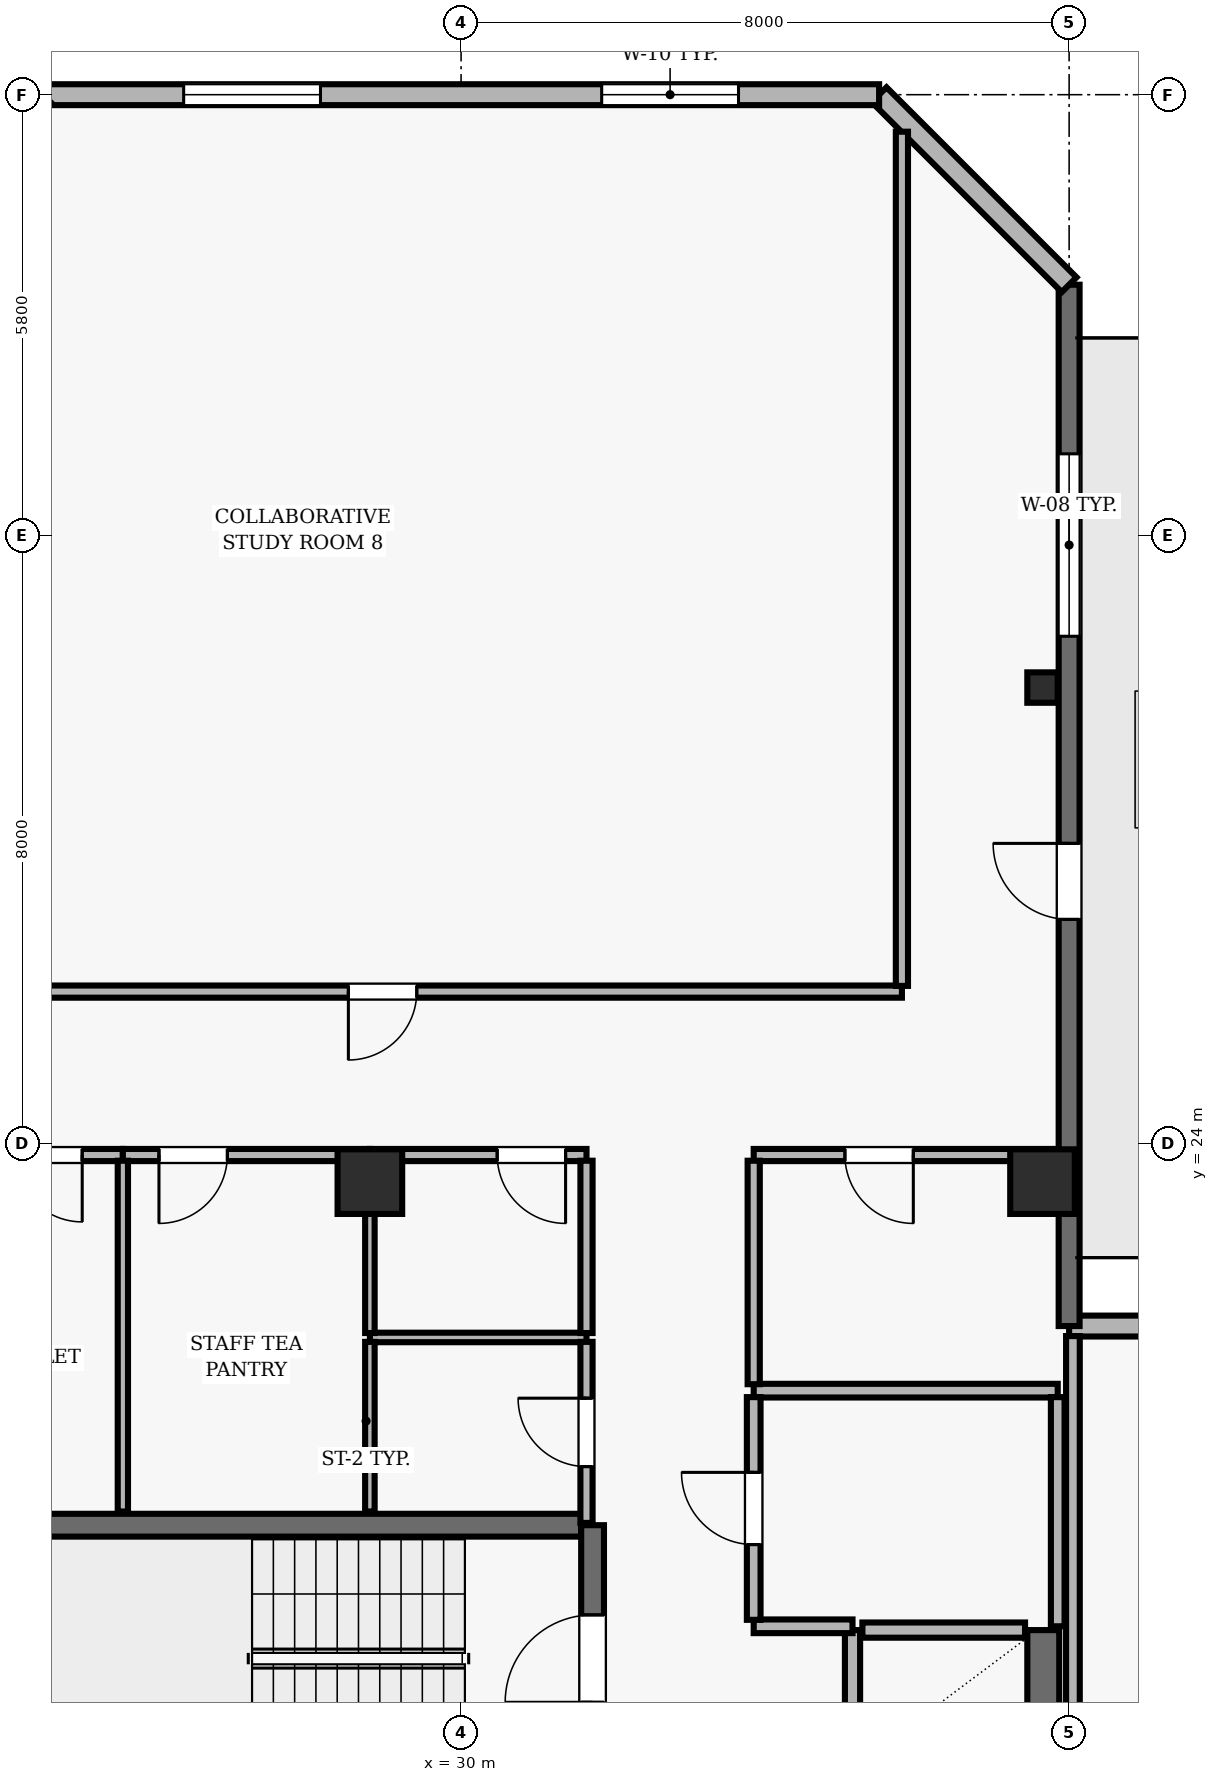
"""IFC4 building model, lengths in metres.
Left out: names, types, materials, properties, quantities, classifications, styles, units other than length and angle.
Written with IfcOpenShell. Run it as: python <this file> out.ifc"""

import sys

from ifc_helpers import new_model, si_unit, direction, frame, frame_2d, origin, origin_2d, place, context, subcontext, project, spatial, rectangle, hollow_rectangle, extrude, element, fill, save


model = new_model("IFC4")
c1 = context("Model", 3, precision=1e-05, world=origin(), true_north=direction((0.0, 1.0)))
c2 = subcontext(c1, "Body", "Model", "MODEL_VIEW")
j1 = project(units=[si_unit("LENGTHUNIT", "METRE"), si_unit("PLANEANGLEUNIT", "RADIAN")], contexts=[c1])
p1 = place(None, origin())
s1 = spatial("IfcSite", under=j1, at=p1, CompositionType="ELEMENT")
p2 = place(p1, origin())
s2 = spatial("IfcBuilding", under=s1, at=p2, CompositionType="ELEMENT")
p3 = place(p2, frame((0.0, 0.0, 291.1)))
s3 = spatial("IfcBuildingStorey", under=s2, at=p3, CompositionType="ELEMENT", Elevation=291.1)
for number, where, z_axis, x_axis in (
    (1, (28.8, 23.5, 0.0), (0.0, 0.0, 1.0), (1.0, 0.0, 0.0)),
    (2, (37.65, 23.5, 0.0), (0.0, 0.0, 1.0), (1.0, 0.0, 0.0)),
):
    element("IfcColumn", number, at=place(p3, frame(where, z_axis=z_axis, x_axis=x_axis)), inside=s3, PredefinedType="COLUMN", context=c2, shape_type="SweptSolid", body=[
        extrude(rectangle(XDim=0.85, YDim=0.85, at=origin_2d()), origin(), (0.0, 0.0, 1.0), 3.9),
    ])
p4 = place(p3, frame((37.65, 30.0, 0.0), z_axis=(0.0, 0.0, 1.0), x_axis=(1.0, 0.0, 0.0)))
e3 = element("IfcColumn", 3, at=p4, inside=s3, PredefinedType="COLUMN", context=c2, shape_type="SweptSolid", body=[
    extrude(hollow_rectangle(XDim=0.4, YDim=0.4, WallThickness=0.02, at=origin_2d()), origin(), (0.0, 0.0, 1.0), 3.9),
])
p5 = place(p3, frame((43.0, 21.6, 0.0), z_axis=(0.0, 0.0, 1.0), x_axis=(-1.0, 0.0, 0.0)))
e4 = element("IfcWall", 4, at=p5, inside=s3, PredefinedType="SOLIDWALL", context=c2, shape_type="SweptSolid", body=[
    extrude(rectangle(XDim=5.0, YDim=0.275, at=frame_2d((2.5, 0.0))), origin(), (0.0, 0.0, 1.0), 3.69),
])
p6 = place(p3, frame((38.0, 21.6, 0.0), z_axis=(0.0, 0.0, 1.0), x_axis=(0.0, 1.0, 0.0)))
e5 = element("IfcWall", 5, at=p6, inside=s3, PredefinedType="SOLIDWALL", context=c2, shape_type="SweptSolid", body=[
    extrude(rectangle(XDim=13.7, YDim=0.275, at=frame_2d((6.85, 0.0))), origin(), (0.0, 0.0, 1.0), 3.69),
])
p7 = place(p6, frame((5.35, 0.0, 0.0)))
e6 = element("IfcOpeningElement", 6, at=p7, cuts=e5, PredefinedType="OPENING", context=c2, shape_type="SweptSolid", body=[
    extrude(rectangle(XDim=1.0, YDim=2.2, at=frame_2d((0.5, 1.1))), frame((0.0, 0.147, 0.0), z_axis=(0.0, -1.0, 0.0), x_axis=(1.0, 0.0, 0.0)), (0.0, 0.0, 1.0), 0.295),
])
p8 = place(p6, frame((9.075, 0.0, 0.9)))
e7 = element("IfcOpeningElement", 7, at=p8, cuts=e5, PredefinedType="OPENING", context=c2, shape_type="SweptSolid", body=[
    extrude(rectangle(XDim=2.4, YDim=1.8, at=frame_2d((1.2, 0.9))), frame((0.0, 0.147, 0.0), z_axis=(0.0, -1.0, 0.0), x_axis=(1.0, 0.0, 0.0)), (0.0, 0.0, 1.0), 0.295),
])
p9 = place(p3, frame((38.0, 35.3, 0.0), z_axis=(0.0, 0.0, 1.0), x_axis=(-0.707106781187, 0.707106781187, 0.0)))
e8 = element("IfcWall", 8, at=p9, inside=s3, PredefinedType="SOLIDWALL", context=c2, shape_type="SweptSolid", body=[
    extrude(rectangle(XDim=3.536, YDim=0.275, at=frame_2d((1.768, 0.0))), origin(), (0.0, 0.0, 1.0), 3.69),
])
p10 = place(p3, frame((35.5, 37.8, 0.0), z_axis=(0.0, 0.0, 1.0), x_axis=(-1.0, 0.0, 0.0)))
e9 = element("IfcWall", 9, at=p10, inside=s3, PredefinedType="SOLIDWALL", context=c2, shape_type="SweptSolid", body=[
    extrude(rectangle(XDim=11.0, YDim=0.275, at=frame_2d((5.5, 0.0))), origin(), (0.0, 0.0, 1.0), 3.69),
])
p11 = place(p10, frame((1.85, 0.0, 0.9)))
e10 = element("IfcOpeningElement", 10, at=p11, cuts=e9, PredefinedType="OPENING", context=c2, shape_type="SweptSolid", body=[
    extrude(rectangle(XDim=1.8, YDim=2.2, at=frame_2d((0.9, 1.1))), frame((0.0, 0.147, 0.0), z_axis=(0.0, -1.0, 0.0), x_axis=(1.0, 0.0, 0.0)), (0.0, 0.0, 1.0), 0.295),
])
p12 = place(p10, frame((7.35, 0.0, 0.9)))
e11 = element("IfcOpeningElement", 11, at=p12, cuts=e9, PredefinedType="OPENING", context=c2, shape_type="SweptSolid", body=[
    extrude(rectangle(XDim=1.8, YDim=2.2, at=frame_2d((0.9, 1.1))), frame((0.0, 0.147, 0.0), z_axis=(0.0, -1.0, 0.0), x_axis=(1.0, 0.0, 0.0)), (0.0, 0.0, 1.0), 0.295),
])
p13 = place(p3, frame((31.58, 18.98, 0.0), z_axis=(0.0, 0.0, 1.0), x_axis=(-1.0, 0.0, 0.0)))
e12 = element("IfcWall", 12, at=p13, inside=s3, PredefinedType="SHEAR", context=c2, shape_type="SweptSolid", body=[
    extrude(rectangle(XDim=8.36, YDim=0.3, at=frame_2d((4.18, 0.0))), origin(), (0.0, 0.0, 1.0), 3.69),
])
p14 = place(p3, frame((31.73, 15.47, 0.0), z_axis=(0.0, 0.0, 1.0), x_axis=(0.0, 1.0, 0.0)))
e13 = element("IfcWall", 13, at=p14, inside=s3, PredefinedType="SHEAR", context=c2, shape_type="SweptSolid", body=[
    extrude(rectangle(XDim=3.51, YDim=0.3, at=frame_2d((1.755, 0.0))), origin(), (0.0, 0.0, 1.0), 3.69),
])
p15 = place(p14, frame((1.18, 0.0, 0.0)))
e14 = element("IfcOpeningElement", 14, at=p15, cuts=e13, PredefinedType="OPENING", context=c2, shape_type="SweptSolid", body=[
    extrude(rectangle(XDim=1.15, YDim=2.15, at=frame_2d((0.575, 1.075))), frame((0.0, 0.16, 0.0), z_axis=(0.0, -1.0, 0.0), x_axis=(1.0, 0.0, 0.0)), (0.0, 0.0, 1.0), 0.32),
])
p16 = place(p3, frame((35.15, 17.6, 0.0), z_axis=(0.0, 0.0, 1.0), x_axis=(0.0, -1.0, 0.0)))
e15 = element("IfcWall", 15, at=p16, inside=s3, PredefinedType="SOLIDWALL", context=c2, shape_type="SweptSolid", body=[
    extrude(rectangle(XDim=1.85, YDim=0.2, at=frame_2d((0.925, 0.0))), origin(), (0.0, 0.0, 1.0), 3.69),
])
p17 = place(p3, frame((37.66, 15.75, 0.0), z_axis=(0.0, 0.0, 1.0), x_axis=(0.0, 1.0, 0.0)))
e16 = element("IfcWall", 16, at=p17, inside=s3, PredefinedType="SHEAR", context=c2, shape_type="SweptSolid", body=[
    extrude(rectangle(XDim=1.85, YDim=0.42, at=frame_2d((0.925, 0.0))), origin(), (0.0, 0.0, 1.0), 3.69),
])
p18 = place(p3, frame((37.42, 17.6, 0.0), z_axis=(0.0, 0.0, 1.0), x_axis=(-1.0, 0.0, 0.0)))
e17 = element("IfcWall", 17, at=p18, inside=s3, PredefinedType="SOLIDWALL", context=c2, shape_type="SweptSolid", body=[
    extrude(rectangle(XDim=2.14, YDim=0.2, at=frame_2d((1.07, 0.0))), origin(), (0.0, 0.0, 1.0), 3.69),
])
p19 = place(p3, frame((25.55, 23.85, 0.0), z_axis=(0.0, 0.0, 1.0), x_axis=(-1.0, 0.0, 0.0)))
e18 = element("IfcWall", 18, at=p19, inside=s3, PredefinedType="PARTITIONING", context=c2, shape_type="SweptSolid", body=[
    extrude(rectangle(XDim=3.35, YDim=0.16, at=frame_2d((1.675, 0.0))), origin(), (0.0, 0.0, 1.0), 3.227),
])
p20 = place(p19, frame((0.535, 0.0, 0.0)))
e19 = element("IfcOpeningElement", 19, at=p20, cuts=e18, PredefinedType="OPENING", context=c2, shape_type="SweptSolid", body=[
    extrude(rectangle(XDim=0.88, YDim=2.1, at=frame_2d((0.44, 1.05))), frame((0.0, 0.09, 0.0), z_axis=(0.0, -1.0, 0.0), x_axis=(1.0, 0.0, 0.0)), (0.0, 0.0, 1.0), 0.18),
])
p21 = place(p3, frame((28.8, 23.85, 0.0), z_axis=(0.0, 0.0, 1.0), x_axis=(-1.0, 0.0, 0.0)))
e20 = element("IfcWall", 20, at=p21, inside=s3, PredefinedType="PARTITIONING", context=c2, shape_type="SweptSolid", body=[
    extrude(rectangle(XDim=3.25, YDim=0.16, at=frame_2d((1.625, 0.0))), origin(), (0.0, 0.0, 1.0), 3.227),
])
p22 = place(p21, frame((1.875, 0.0, 0.0)))
e21 = element("IfcOpeningElement", 21, at=p22, cuts=e20, PredefinedType="OPENING", context=c2, shape_type="SweptSolid", body=[
    extrude(rectangle(XDim=0.9, YDim=2.1, at=frame_2d((0.45, 1.05))), frame((0.0, 0.09, 0.0), z_axis=(0.0, -1.0, 0.0), x_axis=(1.0, 0.0, 0.0)), (0.0, 0.0, 1.0), 0.18),
])
p23 = place(p3, frame((31.65, 21.45, 0.0), z_axis=(0.0, 0.0, 1.0), x_axis=(-1.0, 0.0, 0.0)))
e22 = element("IfcWall", 22, at=p23, inside=s3, PredefinedType="PARTITIONING", context=c2, shape_type="SweptSolid", body=[
    extrude(rectangle(XDim=2.85, YDim=0.125, at=frame_2d((1.425, 0.0))), origin(), (0.0, 0.0, 1.0), 3.69),
])
p24 = place(p3, frame((31.65, 23.85, 0.0), z_axis=(0.0, 0.0, 1.0), x_axis=(-1.0, 0.0, 0.0)))
e23 = element("IfcWall", 23, at=p24, inside=s3, PredefinedType="PARTITIONING", context=c2, shape_type="SweptSolid", body=[
    extrude(rectangle(XDim=2.85, YDim=0.16, at=frame_2d((1.425, 0.0))), origin(), (0.0, 0.0, 1.0), 3.227),
])
p25 = place(p24, frame((0.275, 0.0, 0.0)))
e24 = element("IfcOpeningElement", 24, at=p25, cuts=e23, PredefinedType="OPENING", context=c2, shape_type="SweptSolid", body=[
    extrude(rectangle(XDim=0.9, YDim=2.1, at=frame_2d((0.45, 1.05))), frame((0.0, 0.09, 0.0), z_axis=(0.0, -1.0, 0.0), x_axis=(1.0, 0.0, 0.0)), (0.0, 0.0, 1.0), 0.18),
])
p26 = place(p3, frame((33.85, 17.65, 0.0), z_axis=(0.0, 0.0, 1.0), x_axis=(1.0, 0.0, 0.0)))
e25 = element("IfcWall", 25, at=p26, inside=s3, PredefinedType="PARTITIONING", context=c2, shape_type="SweptSolid", body=[
    extrude(rectangle(XDim=1.3, YDim=0.18, at=frame_2d((0.65, 0.0))), origin(), (0.0, 0.0, 1.0), 3.69),
])
p27 = place(p3, frame((35.8, 26.0, 0.0), z_axis=(0.0, 0.0, 1.0), x_axis=(-1.0, 0.0, 0.0)))
e26 = element("IfcWall", 26, at=p27, inside=s3, PredefinedType="PARTITIONING", context=c2, shape_type="SweptSolid", body=[
    extrude(rectangle(XDim=13.667, YDim=0.16, at=frame_2d((6.833, 0.0))), origin(), (0.0, 0.0, 1.0), 3.69),
])
p28 = place(p27, frame((6.383, 0.0, 0.0)))
e27 = element("IfcOpeningElement", 27, at=p28, cuts=e26, PredefinedType="OPENING", context=c2, shape_type="SweptSolid", body=[
    extrude(rectangle(XDim=0.9, YDim=2.1, at=frame_2d((0.45, 1.05))), frame((0.0, 0.09, 0.0), z_axis=(0.0, -1.0, 0.0), x_axis=(1.0, 0.0, 0.0)), (0.0, 0.0, 1.0), 0.18),
])
p29 = place(p3, frame((37.85, 20.75, 0.0), z_axis=(0.0, 0.0, 1.0), x_axis=(-1.0, 0.0, 0.0)))
e28 = element("IfcWall", 28, at=p29, inside=s3, PredefinedType="PARTITIONING", context=c2, shape_type="SweptSolid", body=[
    extrude(rectangle(XDim=4.0, YDim=0.18, at=frame_2d((2.0, 0.0))), origin(), (0.0, 0.0, 1.0), 3.69),
])
p30 = place(p3, frame((37.85, 23.85, 0.0), z_axis=(0.0, 0.0, 1.0), x_axis=(-1.0, 0.0, 0.0)))
e29 = element("IfcWall", 29, at=p30, inside=s3, PredefinedType="PARTITIONING", context=c2, shape_type="SweptSolid", body=[
    extrude(rectangle(XDim=4.0, YDim=0.16, at=frame_2d((2.0, 0.0))), origin(), (0.0, 0.0, 1.0), 3.227),
])
p31 = place(p30, frame((1.9, 0.0, 0.0)))
e30 = element("IfcOpeningElement", 30, at=p31, cuts=e29, PredefinedType="OPENING", context=c2, shape_type="SweptSolid", body=[
    extrude(rectangle(XDim=0.9, YDim=2.1, at=frame_2d((0.45, 1.05))), frame((0.0, 0.09, 0.0), z_axis=(0.0, -1.0, 0.0), x_axis=(1.0, 0.0, 0.0)), (0.0, 0.0, 1.0), 0.18),
])
p32 = place(p3, frame((25.55, 19.16, 0.0), z_axis=(0.0, 0.0, 1.0), x_axis=(0.0, 1.0, 0.0)))
e31 = element("IfcWall", 31, at=p32, inside=s3, PredefinedType="PARTITIONING", context=c2, shape_type="SweptSolid", body=[
    extrude(rectangle(XDim=4.615, YDim=0.135, at=frame_2d((2.308, 0.0))), origin(), (0.0, 0.0, 1.0), 3.69),
])
p33 = place(p3, frame((28.8, 21.392, 0.0), z_axis=(0.0, 0.0, 1.0), x_axis=(0.0, -1.0, 0.0)))
e32 = element("IfcWall", 32, at=p33, inside=s3, PredefinedType="PARTITIONING", context=c2, shape_type="SweptSolid", body=[
    extrude(rectangle(XDim=2.232, YDim=0.125, at=frame_2d((1.116, 0.0))), origin(), (0.0, 0.0, 1.0), 3.69),
])
p34 = place(p3, frame((28.8, 23.775, 0.0), z_axis=(0.0, 0.0, 1.0), x_axis=(0.0, -1.0, 0.0)))
e33 = element("IfcWall", 33, at=p34, inside=s3, PredefinedType="PARTITIONING", context=c2, shape_type="SweptSolid", body=[
    extrude(rectangle(XDim=2.267, YDim=0.125, at=frame_2d((1.133, 0.0))), origin(), (0.0, 0.0, 1.0), 3.69),
])
p35 = place(p3, frame((31.65, 19.01, 0.0), z_axis=(0.0, 0.0, 1.0), x_axis=(0.0, 1.0, 0.0)))
e34 = element("IfcWall", 34, at=p35, inside=s3, PredefinedType="PARTITIONING", context=c2, shape_type="SweptSolid", body=[
    extrude(rectangle(XDim=2.382, YDim=0.16, at=frame_2d((1.191, 0.0))), origin(), (0.0, 0.0, 1.0), 3.69),
])
p36 = place(p35, frame((0.741, 0.0, 0.0)))
e35 = element("IfcOpeningElement", 35, at=p36, cuts=e34, PredefinedType="OPENING", context=c2, shape_type="SweptSolid", body=[
    extrude(rectangle(XDim=0.9, YDim=2.1, at=frame_2d((0.45, 1.05))), frame((0.0, 0.09, 0.0), z_axis=(0.0, -1.0, 0.0), x_axis=(1.0, 0.0, 0.0)), (0.0, 0.0, 1.0), 0.18),
])
p37 = place(p3, frame((31.65, 23.775, 0.0), z_axis=(0.0, 0.0, 1.0), x_axis=(0.0, -1.0, 0.0)))
e36 = element("IfcWall", 36, at=p37, inside=s3, PredefinedType="PARTITIONING", context=c2, shape_type="SweptSolid", body=[
    extrude(rectangle(XDim=2.267, YDim=0.16, at=frame_2d((1.133, 0.0))), origin(), (0.0, 0.0, 1.0), 3.69),
])
p38 = place(p3, frame((33.85, 17.735, 0.0), z_axis=(0.0, 0.0, 1.0), x_axis=(0.0, 1.0, 0.0)))
e37 = element("IfcWall", 37, at=p38, inside=s3, PredefinedType="PARTITIONING", context=c2, shape_type="SweptSolid", body=[
    extrude(rectangle(XDim=2.93, YDim=0.18, at=frame_2d((1.465, 0.0))), origin(), (0.0, 0.0, 1.0), 3.69),
])
p39 = place(p38, frame((0.99, 0.0, 0.0)))
e38 = element("IfcOpeningElement", 38, at=p39, cuts=e37, PredefinedType="OPENING", context=c2, shape_type="SweptSolid", body=[
    extrude(rectangle(XDim=0.95, YDim=2.1, at=frame_2d((0.475, 1.05))), frame((0.0, 0.1, 0.0), z_axis=(0.0, -1.0, 0.0), x_axis=(1.0, 0.0, 0.0)), (0.0, 0.0, 1.0), 0.2),
])
p40 = place(p3, frame((33.85, 20.835, 0.0), z_axis=(0.0, 0.0, 1.0), x_axis=(0.0, 1.0, 0.0)))
e39 = element("IfcWall", 39, at=p40, inside=s3, PredefinedType="PARTITIONING", context=c2, shape_type="SweptSolid", body=[
    extrude(rectangle(XDim=2.94, YDim=0.16, at=frame_2d((1.47, 0.0))), origin(), (0.0, 0.0, 1.0), 3.69),
])
p41 = place(p3, frame((35.8, 37.313, 0.0), z_axis=(0.0, 0.0, 1.0), x_axis=(0.0, -1.0, 0.0)))
e40 = element("IfcWall", 40, at=p41, inside=s3, PredefinedType="PARTITIONING", context=c2, shape_type="SweptSolid", body=[
    extrude(rectangle(XDim=11.238, YDim=0.16, at=frame_2d((5.619, 0.0))), origin(), (0.0, 0.0, 1.0), 3.69),
])
p42 = place(p3, frame((37.85, 17.65, 0.0), z_axis=(0.0, 0.0, 1.0), x_axis=(0.0, 1.0, 0.0)))
e41 = element("IfcWall", 41, at=p42, inside=s3, PredefinedType="PARTITIONING", context=c2, shape_type="SweptSolid", body=[
    extrude(rectangle(XDim=3.015, YDim=0.18, at=frame_2d((1.508, 0.0))), origin(), (0.0, 0.0, 1.0), 3.227),
])
p43 = place(p3, frame((38.05, 21.468, 0.0), z_axis=(0.0, 0.0, 1.0), x_axis=(0.0, -1.0, 0.0)))
e42 = element("IfcWall", 42, at=p43, inside=s3, PredefinedType="PARTITIONING", context=c2, shape_type="SweptSolid", body=[
    extrude(rectangle(XDim=5.393, YDim=0.18, at=frame_2d((2.697, 0.0))), origin(), (0.0, 0.0, 1.0), 3.227),
])
p44 = place(p7, origin())
e43 = element("IfcDoor", 43, at=p44, inside=s3, OperationType="SINGLE_SWING_RIGHT", PredefinedType="DOOR", context=c2, shape_type="SweptSolid", body=[
    extrude(rectangle(XDim=1.0, YDim=2.2, at=frame_2d((0.5, 1.1))), frame((0.0, 0.025, 0.0), z_axis=(0.0, -1.0, 0.0), x_axis=(1.0, 0.0, 0.0)), (0.0, 0.0, 1.0), 0.05),
])
fill(e6, e43)
p45 = place(p8, origin())
e44 = element("IfcWindow", 44, at=p45, inside=s3, PartitioningType="SINGLE_PANEL", PredefinedType="WINDOW", context=c2, shape_type="SweptSolid", body=[
    extrude(rectangle(XDim=2.4, YDim=1.8, at=frame_2d((1.2, 0.9))), frame((0.0, 0.03, 0.0), z_axis=(0.0, -1.0, 0.0), x_axis=(1.0, 0.0, 0.0)), (0.0, 0.0, 1.0), 0.06),
])
fill(e7, e44)
p46 = place(p11, origin())
e45 = element("IfcWindow", 45, at=p46, inside=s3, PartitioningType="SINGLE_PANEL", PredefinedType="WINDOW", context=c2, shape_type="SweptSolid", body=[
    extrude(rectangle(XDim=1.8, YDim=2.2, at=frame_2d((0.9, 1.1))), frame((0.0, 0.03, 0.0), z_axis=(0.0, -1.0, 0.0), x_axis=(1.0, 0.0, 0.0)), (0.0, 0.0, 1.0), 0.06),
])
fill(e10, e45)
p47 = place(p12, origin())
e46 = element("IfcWindow", 46, at=p47, inside=s3, PartitioningType="SINGLE_PANEL", PredefinedType="WINDOW", context=c2, shape_type="SweptSolid", body=[
    extrude(rectangle(XDim=1.8, YDim=2.2, at=frame_2d((0.9, 1.1))), frame((0.0, 0.03, 0.0), z_axis=(0.0, -1.0, 0.0), x_axis=(1.0, 0.0, 0.0)), (0.0, 0.0, 1.0), 0.06),
])
fill(e11, e46)
p48 = place(p15, origin())
e47 = element("IfcDoor", 47, at=p48, inside=s3, OperationType="SINGLE_SWING_LEFT", PredefinedType="DOOR", context=c2, shape_type="SweptSolid", body=[
    extrude(rectangle(XDim=1.15, YDim=2.15, at=frame_2d((0.575, 1.075))), frame((0.0, 0.025, 0.0), z_axis=(0.0, -1.0, 0.0), x_axis=(1.0, 0.0, 0.0)), (0.0, 0.0, 1.0), 0.05),
])
fill(e14, e47)
p49 = place(p39, origin())
e48 = element("IfcDoor", 48, at=p49, inside=s3, OperationType="SINGLE_SWING_RIGHT", PredefinedType="DOOR", context=c2, shape_type="SweptSolid", body=[
    extrude(rectangle(XDim=0.95, YDim=2.1, at=frame_2d((0.475, 1.05))), frame((0.0, 0.025, 0.0), z_axis=(0.0, -1.0, 0.0), x_axis=(1.0, 0.0, 0.0)), (0.0, 0.0, 1.0), 0.05),
])
fill(e38, e48)
p50 = place(p31, origin())
e49 = element("IfcDoor", 49, at=p50, inside=s3, OperationType="SINGLE_SWING_LEFT", PredefinedType="DOOR", context=c2, shape_type="SweptSolid", body=[
    extrude(rectangle(XDim=0.9, YDim=2.1, at=frame_2d((0.45, 1.05))), frame((0.0, 0.025, 0.0), z_axis=(0.0, -1.0, 0.0), x_axis=(1.0, 0.0, 0.0)), (0.0, 0.0, 1.0), 0.05),
])
fill(e30, e49)
p51 = place(p36, origin())
e50 = element("IfcDoor", 50, at=p51, inside=s3, OperationType="SINGLE_SWING_RIGHT", PredefinedType="DOOR", context=c2, shape_type="SweptSolid", body=[
    extrude(rectangle(XDim=0.9, YDim=2.1, at=frame_2d((0.45, 1.05))), frame((0.0, 0.025, 0.0), z_axis=(0.0, -1.0, 0.0), x_axis=(1.0, 0.0, 0.0)), (0.0, 0.0, 1.0), 0.05),
])
fill(e35, e50)
p52 = place(p25, origin())
e51 = element("IfcDoor", 51, at=p52, inside=s3, OperationType="SINGLE_SWING_LEFT", PredefinedType="DOOR", context=c2, shape_type="SweptSolid", body=[
    extrude(rectangle(XDim=0.9, YDim=2.1, at=frame_2d((0.45, 1.05))), frame((0.0, 0.025, 0.0), z_axis=(0.0, -1.0, 0.0), x_axis=(1.0, 0.0, 0.0)), (0.0, 0.0, 1.0), 0.05),
])
fill(e24, e51)
p53 = place(p20, origin())
e52 = element("IfcDoor", 52, at=p53, inside=s3, OperationType="SINGLE_SWING_LEFT", PredefinedType="DOOR", context=c2, shape_type="SweptSolid", body=[
    extrude(rectangle(XDim=0.88, YDim=2.1, at=frame_2d((0.44, 1.05))), frame((0.0, 0.025, 0.0), z_axis=(0.0, -1.0, 0.0), x_axis=(1.0, 0.0, 0.0)), (0.0, 0.0, 1.0), 0.05),
])
fill(e19, e52)
p54 = place(p22, origin())
e53 = element("IfcDoor", 53, at=p54, inside=s3, OperationType="SINGLE_SWING_RIGHT", PredefinedType="DOOR", context=c2, shape_type="SweptSolid", body=[
    extrude(rectangle(XDim=0.9, YDim=2.1, at=frame_2d((0.45, 1.05))), frame((0.0, 0.025, 0.0), z_axis=(0.0, -1.0, 0.0), x_axis=(1.0, 0.0, 0.0)), (0.0, 0.0, 1.0), 0.05),
])
fill(e21, e53)
p55 = place(p28, origin())
e54 = element("IfcDoor", 54, at=p55, inside=s3, OperationType="SINGLE_SWING_RIGHT", PredefinedType="DOOR", context=c2, shape_type="SweptSolid", body=[
    extrude(rectangle(XDim=0.9, YDim=2.1, at=frame_2d((0.45, 1.05))), frame((0.0, 0.025, 0.0), z_axis=(0.0, -1.0, 0.0), x_axis=(1.0, 0.0, 0.0)), (0.0, 0.0, 1.0), 0.05),
])
fill(e27, e54)
save(model, sys.argv[1])
